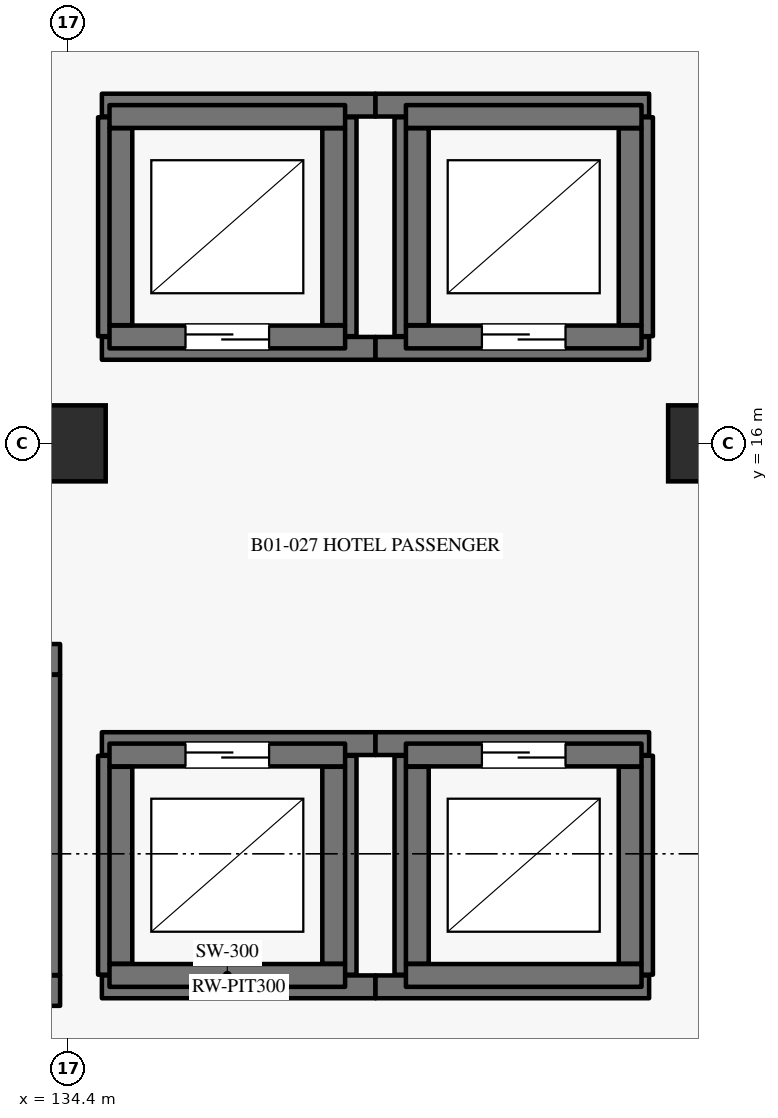
"""IFC4 building model, lengths in metres.
Left out: names, types, materials, properties, quantities, classifications, styles, units other than length and angle.
Written with IfcOpenShell. Run it as: python <this file> out.ifc"""

import sys

from ifc_helpers import new_model, si_unit, direction, frame, frame_2d, origin, origin_2d, place, context, subcontext, project, spatial, rectangle, extrude, element, fill, save


model = new_model("IFC4")
c1 = context("Model", 3, precision=1e-05, world=origin(), true_north=direction((0.0, 1.0)))
c2 = subcontext(c1, "Body", "Model", "MODEL_VIEW")
j1 = project(units=[si_unit("LENGTHUNIT", "METRE"), si_unit("PLANEANGLEUNIT", "RADIAN")], contexts=[c1])
p1 = place(None, origin())
s1 = spatial("IfcSite", under=j1, at=p1, CompositionType="ELEMENT")
p2 = place(p1, origin())
s2 = spatial("IfcBuilding", under=s1, at=p2, CompositionType="ELEMENT")
p3 = place(p2, frame((0.0, 0.0, -5.4)))
s3 = spatial("IfcBuildingStorey", under=s2, at=p3, CompositionType="ELEMENT", Elevation=-5.4)
for number, where, z_axis, x_axis in (
    (1, (134.4, 16.0, 0.0), (0.0, 0.0, 1.0), (1.0, 0.0, 0.0)),
    (2, (142.8, 16.0, 0.0), (0.0, 0.0, 1.0), (1.0, 0.0, 0.0)),
):
    element("IfcColumn", number, at=place(p3, frame(where, z_axis=z_axis, x_axis=x_axis)), inside=s3, PredefinedType="COLUMN", context=c2, shape_type="SweptSolid", body=[
        extrude(rectangle(XDim=1.0, YDim=1.0, at=origin_2d()), origin(), (0.0, 0.0, 1.0), 5.4),
    ])
p4 = place(p3, frame((134.85, 17.25, -1.4), z_axis=(0.0, 0.0, 1.0), x_axis=(1.0, 0.0, 0.0)))
e3 = element("IfcWall", 3, at=p4, inside=s3, PredefinedType="USERDEFINED", context=c2, shape_type="SweptSolid", body=[
    extrude(rectangle(XDim=3.6, YDim=0.3, at=frame_2d((1.8, 0.0))), origin(), (0.0, 0.0, 1.0), 1.4),
])
p5 = place(p3, frame((138.05, 17.41, -1.4), z_axis=(0.0, 0.0, 1.0), x_axis=(0.0, 1.0, 0.0)))
e4 = element("IfcWall", 4, at=p5, inside=s3, PredefinedType="USERDEFINED", context=c2, shape_type="SweptSolid", body=[
    extrude(rectangle(XDim=2.88, YDim=0.3, at=frame_2d((1.44, 0.0))), origin(), (0.0, 0.0, 1.0), 1.4),
])
p6 = place(p3, frame((138.45, 20.45, -1.4), z_axis=(0.0, 0.0, 1.0), x_axis=(-1.0, 0.0, 0.0)))
e5 = element("IfcWall", 5, at=p6, inside=s3, PredefinedType="USERDEFINED", context=c2, shape_type="SweptSolid", body=[
    extrude(rectangle(XDim=3.6, YDim=0.3, at=frame_2d((1.8, 0.0))), origin(), (0.0, 0.0, 1.0), 1.4),
])
p7 = place(p3, frame((134.95, 20.29, -1.4), z_axis=(0.0, 0.0, 1.0), x_axis=(0.0, -1.0, 0.0)))
e6 = element("IfcWall", 6, at=p7, inside=s3, PredefinedType="USERDEFINED", context=c2, shape_type="SweptSolid", body=[
    extrude(rectangle(XDim=2.88, YDim=0.3, at=frame_2d((1.44, 0.0))), origin(), (0.0, 0.0, 1.0), 1.4),
])
p8 = place(p3, frame((138.45, 17.25, -1.4), z_axis=(0.0, 0.0, 1.0), x_axis=(1.0, 0.0, 0.0)))
e7 = element("IfcWall", 7, at=p8, inside=s3, PredefinedType="USERDEFINED", context=c2, shape_type="SweptSolid", body=[
    extrude(rectangle(XDim=3.6, YDim=0.3, at=frame_2d((1.8, 0.0))), origin(), (0.0, 0.0, 1.0), 1.4),
])
p9 = place(p3, frame((141.95, 17.41, -1.4), z_axis=(0.0, 0.0, 1.0), x_axis=(0.0, 1.0, 0.0)))
e8 = element("IfcWall", 8, at=p9, inside=s3, PredefinedType="USERDEFINED", context=c2, shape_type="SweptSolid", body=[
    extrude(rectangle(XDim=2.88, YDim=0.3, at=frame_2d((1.44, 0.0))), origin(), (0.0, 0.0, 1.0), 1.4),
])
p10 = place(p3, frame((142.05, 20.45, -1.4), z_axis=(0.0, 0.0, 1.0), x_axis=(-1.0, 0.0, 0.0)))
e9 = element("IfcWall", 9, at=p10, inside=s3, PredefinedType="USERDEFINED", context=c2, shape_type="SweptSolid", body=[
    extrude(rectangle(XDim=3.6, YDim=0.3, at=frame_2d((1.8, 0.0))), origin(), (0.0, 0.0, 1.0), 1.4),
])
p11 = place(p3, frame((138.85, 20.29, -1.4), z_axis=(0.0, 0.0, 1.0), x_axis=(0.0, -1.0, 0.0)))
e10 = element("IfcWall", 10, at=p11, inside=s3, PredefinedType="USERDEFINED", context=c2, shape_type="SweptSolid", body=[
    extrude(rectangle(XDim=2.88, YDim=0.3, at=frame_2d((1.44, 0.0))), origin(), (0.0, 0.0, 1.0), 1.4),
])
p12 = place(p3, frame((134.85, 8.85, -1.4), z_axis=(0.0, 0.0, 1.0), x_axis=(1.0, 0.0, 0.0)))
e11 = element("IfcWall", 11, at=p12, inside=s3, PredefinedType="USERDEFINED", context=c2, shape_type="SweptSolid", body=[
    extrude(rectangle(XDim=3.6, YDim=0.3, at=frame_2d((1.8, 0.0))), origin(), (0.0, 0.0, 1.0), 1.4),
])
p13 = place(p3, frame((138.05, 9.01, -1.4), z_axis=(0.0, 0.0, 1.0), x_axis=(0.0, 1.0, 0.0)))
e12 = element("IfcWall", 12, at=p13, inside=s3, PredefinedType="USERDEFINED", context=c2, shape_type="SweptSolid", body=[
    extrude(rectangle(XDim=2.88, YDim=0.3, at=frame_2d((1.44, 0.0))), origin(), (0.0, 0.0, 1.0), 1.4),
])
p14 = place(p3, frame((138.45, 12.05, -1.4), z_axis=(0.0, 0.0, 1.0), x_axis=(-1.0, 0.0, 0.0)))
e13 = element("IfcWall", 13, at=p14, inside=s3, PredefinedType="USERDEFINED", context=c2, shape_type="SweptSolid", body=[
    extrude(rectangle(XDim=3.6, YDim=0.3, at=frame_2d((1.8, 0.0))), origin(), (0.0, 0.0, 1.0), 1.4),
])
p15 = place(p3, frame((134.95, 11.89, -1.4), z_axis=(0.0, 0.0, 1.0), x_axis=(0.0, -1.0, 0.0)))
e14 = element("IfcWall", 14, at=p15, inside=s3, PredefinedType="USERDEFINED", context=c2, shape_type="SweptSolid", body=[
    extrude(rectangle(XDim=2.88, YDim=0.3, at=frame_2d((1.44, 0.0))), origin(), (0.0, 0.0, 1.0), 1.4),
])
p16 = place(p3, frame((138.45, 8.85, -1.4), z_axis=(0.0, 0.0, 1.0), x_axis=(1.0, 0.0, 0.0)))
e15 = element("IfcWall", 15, at=p16, inside=s3, PredefinedType="USERDEFINED", context=c2, shape_type="SweptSolid", body=[
    extrude(rectangle(XDim=3.6, YDim=0.3, at=frame_2d((1.8, 0.0))), origin(), (0.0, 0.0, 1.0), 1.4),
])
p17 = place(p3, frame((141.95, 9.01, -1.4), z_axis=(0.0, 0.0, 1.0), x_axis=(0.0, 1.0, 0.0)))
e16 = element("IfcWall", 16, at=p17, inside=s3, PredefinedType="USERDEFINED", context=c2, shape_type="SweptSolid", body=[
    extrude(rectangle(XDim=2.88, YDim=0.3, at=frame_2d((1.44, 0.0))), origin(), (0.0, 0.0, 1.0), 1.4),
])
p18 = place(p3, frame((142.05, 12.05, -1.4), z_axis=(0.0, 0.0, 1.0), x_axis=(-1.0, 0.0, 0.0)))
e17 = element("IfcWall", 17, at=p18, inside=s3, PredefinedType="USERDEFINED", context=c2, shape_type="SweptSolid", body=[
    extrude(rectangle(XDim=3.6, YDim=0.3, at=frame_2d((1.8, 0.0))), origin(), (0.0, 0.0, 1.0), 1.4),
])
p19 = place(p3, frame((138.85, 11.89, -1.4), z_axis=(0.0, 0.0, 1.0), x_axis=(0.0, -1.0, 0.0)))
e18 = element("IfcWall", 18, at=p19, inside=s3, PredefinedType="USERDEFINED", context=c2, shape_type="SweptSolid", body=[
    extrude(rectangle(XDim=2.88, YDim=0.3, at=frame_2d((1.44, 0.0))), origin(), (0.0, 0.0, 1.0), 1.4),
])
p20 = place(p3, frame((134.95, 17.4, 0.0), z_axis=(0.0, 0.0, 1.0), x_axis=(1.0, 0.0, 0.0)))
e19 = element("IfcWall", 19, at=p20, inside=s3, PredefinedType="SHEAR", context=c2, shape_type="SweptSolid", body=[
    extrude(rectangle(XDim=3.1, YDim=0.3, at=frame_2d((1.55, 0.0))), origin(), (0.0, 0.0, 1.0), 4.995),
])
p21 = place(p20, frame((1.0, 0.0, 0.0)))
e20 = element("IfcOpeningElement", 20, at=p21, cuts=e19, PredefinedType="OPENING", context=c2, shape_type="SweptSolid", body=[
    extrude(rectangle(XDim=1.1, YDim=2.2, at=frame_2d((0.55, 1.1))), frame((0.0, 0.16, 0.0), z_axis=(0.0, -1.0, 0.0), x_axis=(1.0, 0.0, 0.0)), (0.0, 0.0, 1.0), 0.32),
])
p22 = place(p3, frame((137.9, 17.555, 0.0), z_axis=(0.0, 0.0, 1.0), x_axis=(0.0, 1.0, 0.0)))
e21 = element("IfcWall", 21, at=p22, inside=s3, PredefinedType="SHEAR", context=c2, shape_type="SweptSolid", body=[
    extrude(rectangle(XDim=2.59, YDim=0.3, at=frame_2d((1.295, 0.0))), origin(), (0.0, 0.0, 1.0), 4.995),
])
p23 = place(p3, frame((138.05, 20.3, 0.0), z_axis=(0.0, 0.0, 1.0), x_axis=(-1.0, 0.0, 0.0)))
e22 = element("IfcWall", 22, at=p23, inside=s3, PredefinedType="SHEAR", context=c2, shape_type="SweptSolid", body=[
    extrude(rectangle(XDim=3.1, YDim=0.3, at=frame_2d((1.55, 0.0))), origin(), (0.0, 0.0, 1.0), 4.995),
])
p24 = place(p3, frame((135.1, 20.145, 0.0), z_axis=(0.0, 0.0, 1.0), x_axis=(0.0, -1.0, 0.0)))
e23 = element("IfcWall", 23, at=p24, inside=s3, PredefinedType="SHEAR", context=c2, shape_type="SweptSolid", body=[
    extrude(rectangle(XDim=2.59, YDim=0.3, at=frame_2d((1.295, 0.0))), origin(), (0.0, 0.0, 1.0), 4.995),
])
p25 = place(p3, frame((138.85, 17.4, 0.0), z_axis=(0.0, 0.0, 1.0), x_axis=(1.0, 0.0, 0.0)))
e24 = element("IfcWall", 24, at=p25, inside=s3, PredefinedType="SHEAR", context=c2, shape_type="SweptSolid", body=[
    extrude(rectangle(XDim=3.1, YDim=0.3, at=frame_2d((1.55, 0.0))), origin(), (0.0, 0.0, 1.0), 4.995),
])
p26 = place(p25, frame((1.0, 0.0, 0.0)))
e25 = element("IfcOpeningElement", 25, at=p26, cuts=e24, PredefinedType="OPENING", context=c2, shape_type="SweptSolid", body=[
    extrude(rectangle(XDim=1.1, YDim=2.2, at=frame_2d((0.55, 1.1))), frame((0.0, 0.16, 0.0), z_axis=(0.0, -1.0, 0.0), x_axis=(1.0, 0.0, 0.0)), (0.0, 0.0, 1.0), 0.32),
])
p27 = place(p3, frame((141.8, 17.555, 0.0), z_axis=(0.0, 0.0, 1.0), x_axis=(0.0, 1.0, 0.0)))
e26 = element("IfcWall", 26, at=p27, inside=s3, PredefinedType="SHEAR", context=c2, shape_type="SweptSolid", body=[
    extrude(rectangle(XDim=2.59, YDim=0.3, at=frame_2d((1.295, 0.0))), origin(), (0.0, 0.0, 1.0), 4.995),
])
p28 = place(p3, frame((141.95, 20.3, 0.0), z_axis=(0.0, 0.0, 1.0), x_axis=(-1.0, 0.0, 0.0)))
e27 = element("IfcWall", 27, at=p28, inside=s3, PredefinedType="SHEAR", context=c2, shape_type="SweptSolid", body=[
    extrude(rectangle(XDim=3.1, YDim=0.3, at=frame_2d((1.55, 0.0))), origin(), (0.0, 0.0, 1.0), 4.995),
])
p29 = place(p3, frame((139.0, 20.145, 0.0), z_axis=(0.0, 0.0, 1.0), x_axis=(0.0, -1.0, 0.0)))
e28 = element("IfcWall", 28, at=p29, inside=s3, PredefinedType="SHEAR", context=c2, shape_type="SweptSolid", body=[
    extrude(rectangle(XDim=2.59, YDim=0.3, at=frame_2d((1.295, 0.0))), origin(), (0.0, 0.0, 1.0), 4.995),
])
p30 = place(p3, frame((134.95, 9.0, 0.0), z_axis=(0.0, 0.0, 1.0), x_axis=(1.0, 0.0, 0.0)))
e29 = element("IfcWall", 29, at=p30, inside=s3, PredefinedType="SHEAR", context=c2, shape_type="SweptSolid", body=[
    extrude(rectangle(XDim=3.1, YDim=0.3, at=frame_2d((1.55, 0.0))), origin(), (0.0, 0.0, 1.0), 4.995),
])
p31 = place(p3, frame((137.9, 9.155, 0.0), z_axis=(0.0, 0.0, 1.0), x_axis=(0.0, 1.0, 0.0)))
e30 = element("IfcWall", 30, at=p31, inside=s3, PredefinedType="SHEAR", context=c2, shape_type="SweptSolid", body=[
    extrude(rectangle(XDim=2.59, YDim=0.3, at=frame_2d((1.295, 0.0))), origin(), (0.0, 0.0, 1.0), 4.995),
])
p32 = place(p3, frame((138.05, 11.9, 0.0), z_axis=(0.0, 0.0, 1.0), x_axis=(-1.0, 0.0, 0.0)))
e31 = element("IfcWall", 31, at=p32, inside=s3, PredefinedType="SHEAR", context=c2, shape_type="SweptSolid", body=[
    extrude(rectangle(XDim=3.1, YDim=0.3, at=frame_2d((1.55, 0.0))), origin(), (0.0, 0.0, 1.0), 4.995),
])
p33 = place(p32, frame((1.0, 0.0, 0.0)))
e32 = element("IfcOpeningElement", 32, at=p33, cuts=e31, PredefinedType="OPENING", context=c2, shape_type="SweptSolid", body=[
    extrude(rectangle(XDim=1.1, YDim=2.2, at=frame_2d((0.55, 1.1))), frame((0.0, 0.16, 0.0), z_axis=(0.0, -1.0, 0.0), x_axis=(1.0, 0.0, 0.0)), (0.0, 0.0, 1.0), 0.32),
])
p34 = place(p3, frame((135.1, 11.745, 0.0), z_axis=(0.0, 0.0, 1.0), x_axis=(0.0, -1.0, 0.0)))
e33 = element("IfcWall", 33, at=p34, inside=s3, PredefinedType="SHEAR", context=c2, shape_type="SweptSolid", body=[
    extrude(rectangle(XDim=2.59, YDim=0.3, at=frame_2d((1.295, 0.0))), origin(), (0.0, 0.0, 1.0), 4.995),
])
p35 = place(p3, frame((138.85, 9.0, 0.0), z_axis=(0.0, 0.0, 1.0), x_axis=(1.0, 0.0, 0.0)))
e34 = element("IfcWall", 34, at=p35, inside=s3, PredefinedType="SHEAR", context=c2, shape_type="SweptSolid", body=[
    extrude(rectangle(XDim=3.1, YDim=0.3, at=frame_2d((1.55, 0.0))), origin(), (0.0, 0.0, 1.0), 4.995),
])
p36 = place(p3, frame((141.8, 9.155, 0.0), z_axis=(0.0, 0.0, 1.0), x_axis=(0.0, 1.0, 0.0)))
e35 = element("IfcWall", 35, at=p36, inside=s3, PredefinedType="SHEAR", context=c2, shape_type="SweptSolid", body=[
    extrude(rectangle(XDim=2.59, YDim=0.3, at=frame_2d((1.295, 0.0))), origin(), (0.0, 0.0, 1.0), 4.995),
])
p37 = place(p3, frame((141.95, 11.9, 0.0), z_axis=(0.0, 0.0, 1.0), x_axis=(-1.0, 0.0, 0.0)))
e36 = element("IfcWall", 36, at=p37, inside=s3, PredefinedType="SHEAR", context=c2, shape_type="SweptSolid", body=[
    extrude(rectangle(XDim=3.1, YDim=0.3, at=frame_2d((1.55, 0.0))), origin(), (0.0, 0.0, 1.0), 4.995),
])
p38 = place(p37, frame((1.0, 0.0, 0.0)))
e37 = element("IfcOpeningElement", 37, at=p38, cuts=e36, PredefinedType="OPENING", context=c2, shape_type="SweptSolid", body=[
    extrude(rectangle(XDim=1.1, YDim=2.2, at=frame_2d((0.55, 1.1))), frame((0.0, 0.16, 0.0), z_axis=(0.0, -1.0, 0.0), x_axis=(1.0, 0.0, 0.0)), (0.0, 0.0, 1.0), 0.32),
])
p39 = place(p3, frame((139.0, 11.745, 0.0), z_axis=(0.0, 0.0, 1.0), x_axis=(0.0, -1.0, 0.0)))
e38 = element("IfcWall", 38, at=p39, inside=s3, PredefinedType="SHEAR", context=c2, shape_type="SweptSolid", body=[
    extrude(rectangle(XDim=2.59, YDim=0.3, at=frame_2d((1.295, 0.0))), origin(), (0.0, 0.0, 1.0), 4.995),
])
p40 = place(p3, frame((126.1, 8.8, 0.0), z_axis=(0.0, 0.0, 1.0), x_axis=(1.0, 0.0, 0.0)))
e39 = element("IfcWall", 39, at=p40, inside=s3, PredefinedType="SHEAR", context=c2, shape_type="SweptSolid", body=[
    extrude(rectangle(XDim=8.2, YDim=0.4, at=frame_2d((4.1, 0.0))), origin(), (0.0, 0.0, 1.0), 4.995),
])
p41 = place(p3, frame((134.1, 9.005, 0.0), z_axis=(0.0, 0.0, 1.0), x_axis=(0.0, 1.0, 0.0)))
e40 = element("IfcWall", 40, at=p41, inside=s3, PredefinedType="SHEAR", context=c2, shape_type="SweptSolid", body=[
    extrude(rectangle(XDim=3.95, YDim=0.4, at=frame_2d((1.975, 0.0))), origin(), (0.0, 0.0, 1.0), 4.995),
])
p42 = place(p3, frame((126.1, 13.16, 0.0), z_axis=(0.0, 0.0, 1.0), x_axis=(1.0, 0.0, 0.0)))
e41 = element("IfcWall", 41, at=p42, inside=s3, PredefinedType="SHEAR", context=c2, shape_type="SweptSolid", body=[
    extrude(rectangle(XDim=8.2, YDim=0.4, at=frame_2d((4.1, 0.0))), origin(), (0.0, 0.0, 1.0), 4.995),
])
p43 = place(p42, frame((0.43, 0.0, 0.0)))
e42 = element("IfcOpeningElement", 42, at=p43, cuts=e41, PredefinedType="OPENING", context=c2, shape_type="SweptSolid", body=[
    extrude(rectangle(XDim=1.16, YDim=2.2, at=frame_2d((0.58, 1.1))), frame((0.0, 0.21, 0.0), z_axis=(0.0, -1.0, 0.0), x_axis=(1.0, 0.0, 0.0)), (0.0, 0.0, 1.0), 0.42),
])
p44 = place(p21, origin())
e43 = element("IfcDoor", 43, at=p44, inside=s3, OperationType="DOUBLE_DOOR_SLIDING", PredefinedType="DOOR", context=c2, shape_type="SweptSolid", body=[
    extrude(rectangle(XDim=1.1, YDim=2.2, at=frame_2d((0.55, 1.1))), frame((0.0, 0.025, 0.0), z_axis=(0.0, -1.0, 0.0), x_axis=(1.0, 0.0, 0.0)), (0.0, 0.0, 1.0), 0.05),
])
fill(e20, e43)
p45 = place(p26, origin())
e44 = element("IfcDoor", 44, at=p45, inside=s3, OperationType="DOUBLE_DOOR_SLIDING", PredefinedType="DOOR", context=c2, shape_type="SweptSolid", body=[
    extrude(rectangle(XDim=1.1, YDim=2.2, at=frame_2d((0.55, 1.1))), frame((0.0, 0.025, 0.0), z_axis=(0.0, -1.0, 0.0), x_axis=(1.0, 0.0, 0.0)), (0.0, 0.0, 1.0), 0.05),
])
fill(e25, e44)
p46 = place(p33, origin())
e45 = element("IfcDoor", 45, at=p46, inside=s3, OperationType="DOUBLE_DOOR_SLIDING", PredefinedType="DOOR", context=c2, shape_type="SweptSolid", body=[
    extrude(rectangle(XDim=1.1, YDim=2.2, at=frame_2d((0.55, 1.1))), frame((0.0, 0.025, 0.0), z_axis=(0.0, -1.0, 0.0), x_axis=(1.0, 0.0, 0.0)), (0.0, 0.0, 1.0), 0.05),
])
fill(e32, e45)
p47 = place(p38, origin())
e46 = element("IfcDoor", 46, at=p47, inside=s3, OperationType="DOUBLE_DOOR_SLIDING", PredefinedType="DOOR", context=c2, shape_type="SweptSolid", body=[
    extrude(rectangle(XDim=1.1, YDim=2.2, at=frame_2d((0.55, 1.1))), frame((0.0, 0.025, 0.0), z_axis=(0.0, -1.0, 0.0), x_axis=(1.0, 0.0, 0.0)), (0.0, 0.0, 1.0), 0.05),
])
fill(e37, e46)
save(model, sys.argv[1])
